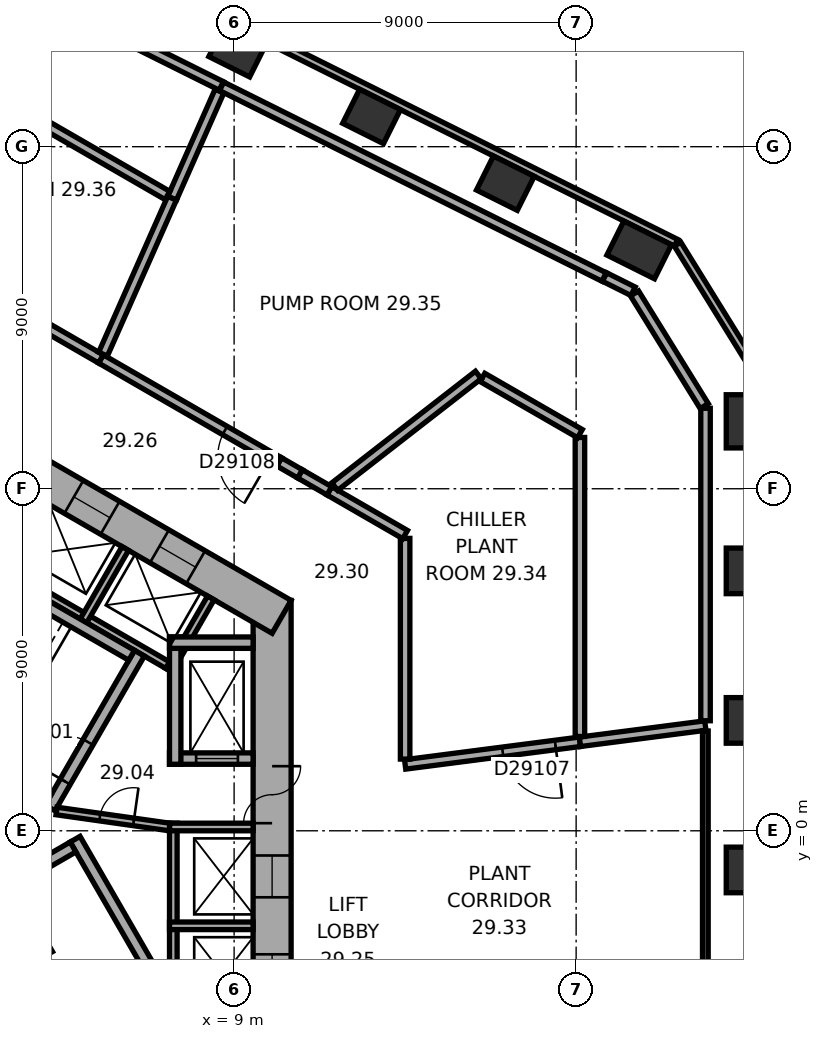
"""IFC4 building model, lengths in metres.
Left out: names, types, materials, properties, quantities, classifications, styles, units other than length and angle.
Written with IfcOpenShell. Run it as: python <this file> out.ifc"""

import sys

from ifc_helpers import new_model, si_unit, direction, frame, frame_2d, origin, origin_2d, place, context, subcontext, project, spatial, rectangle, extrude, element, fill, save


model = new_model("IFC4")
c1 = context("Model", 3, precision=1e-05, world=origin(), true_north=direction((0.0, 1.0)))
c2 = subcontext(c1, "Body", "Model", "MODEL_VIEW")
j1 = project(units=[si_unit("LENGTHUNIT", "METRE"), si_unit("PLANEANGLEUNIT", "RADIAN")], contexts=[c1])
p1 = place(None, origin())
s1 = spatial("IfcSite", under=j1, at=p1, CompositionType="ELEMENT")
p2 = place(p1, origin())
s2 = spatial("IfcBuilding", under=s1, at=p2, CompositionType="ELEMENT")
p3 = place(p2, frame((0.0, 0.0, 119.9)))
s3 = spatial("IfcBuildingStorey", under=s2, at=p3, CompositionType="ELEMENT", Elevation=119.9)
for number, where, z_axis, x_axis in (
    (1, (22.45, -1.03, 0.0), (0.0, 0.0, 1.0), (0.0, 1.0, 0.0)),
    (2, (22.45, 2.905, 0.0), (0.0, 0.0, 1.0), (0.0, 1.0, 0.0)),
    (3, (22.45, 6.839, 0.0), (0.0, 0.0, 1.0), (0.0, 1.0, 0.0)),
):
    element("IfcColumn", number, at=place(p3, frame(where, z_axis=z_axis, x_axis=x_axis)), inside=s3, PredefinedType="COLUMN", context=c2, shape_type="SweptSolid", body=[
        extrude(rectangle(XDim=1.2, YDim=1.0, at=origin_2d()), origin(), (0.0, 0.0, 1.0), 4.5),
    ])
for number, where, z_axis, x_axis in (
    (4, (22.45, 10.774, 0.0), (0.0, 0.0, 1.0), (0.0, 1.0, 0.0)),
    (5, (19.659, 15.284, 0.0), (0.0, 0.0, 1.0), (-0.895, 0.446, 0.0)),
):
    element("IfcColumn", number, at=place(p3, frame(where, z_axis=z_axis, x_axis=x_axis)), inside=s3, PredefinedType="COLUMN", context=c2, shape_type="SweptSolid", body=[
        extrude(rectangle(XDim=1.4, YDim=1.0, at=origin_2d()), origin(), (0.0, 0.0, 1.0), 4.5),
    ])
for number, where, z_axis, x_axis in (
    (6, (16.138, 17.04, 0.0), (0.0, 0.0, 1.0), (-0.895, 0.446, 0.0)),
    (7, (12.616, 18.795, 0.0), (0.0, 0.0, 1.0), (-0.895, 0.446, 0.0)),
    (8, (9.095, 20.551, 0.0), (0.0, 0.0, 1.0), (-0.895, 0.446, 0.0)),
):
    element("IfcColumn", number, at=place(p3, frame(where, z_axis=z_axis, x_axis=x_axis)), inside=s3, PredefinedType="COLUMN", context=c2, shape_type="SweptSolid", body=[
        extrude(rectangle(XDim=1.2, YDim=1.0, at=origin_2d()), origin(), (0.0, 0.0, 1.0), 4.5),
    ])
p4 = place(p3, frame((10.0, -6.062, 0.0), z_axis=(0.0, 0.0, 1.0), x_axis=(0.0, 1.0, 0.0)))
e9 = element("IfcWall", 9, at=p4, inside=s3, PredefinedType="SHEAR", context=c2, shape_type="SweptSolid", body=[
    extrude(rectangle(XDim=12.125, YDim=1.0, at=frame_2d((6.062, 0.0))), origin(), (0.0, 0.0, 1.0), 4.5),
])
p5 = place(p4, frame((6.262, 0.0, 0.0)))
e10 = element("IfcOpeningElement", 10, at=p5, cuts=e9, PredefinedType="OPENING", context=c2, shape_type="SweptSolid", body=[
    extrude(rectangle(XDim=1.5, YDim=2.1, at=frame_2d((0.75, 1.05))), frame((0.0, 0.51, 0.0), z_axis=(0.0, -1.0, 0.0), x_axis=(1.0, 0.0, 0.0)), (0.0, 0.0, 1.0), 1.02),
])
p6 = place(p4, frame((1.712, 0.0, 0.0)))
e11 = element("IfcOpeningElement", 11, at=p6, cuts=e9, PredefinedType="OPENING", context=c2, shape_type="SweptSolid", body=[
    extrude(rectangle(XDim=1.1, YDim=2.1, at=frame_2d((0.55, 1.05))), frame((0.0, 0.51, 0.0), z_axis=(0.0, -1.0, 0.0), x_axis=(1.0, 0.0, 0.0)), (0.0, 0.0, 1.0), 1.02),
])
p7 = place(p4, frame((4.312, 0.0, 0.0)))
e12 = element("IfcOpeningElement", 12, at=p7, cuts=e9, PredefinedType="OPENING", context=c2, shape_type="SweptSolid", body=[
    extrude(rectangle(XDim=1.1, YDim=2.1, at=frame_2d((0.55, 1.05))), frame((0.0, 0.51, 0.0), z_axis=(0.0, -1.0, 0.0), x_axis=(1.0, 0.0, 0.0)), (0.0, 0.0, 1.0), 1.02),
])
p8 = place(p3, frame((10.25, 5.629, 0.0), z_axis=(0.0, 0.0, 1.0), x_axis=(-0.866022616891, 0.50000482701, 0.0)))
e13 = element("IfcWall", 13, at=p8, inside=s3, PredefinedType="SHEAR", context=c2, shape_type="SweptSolid", body=[
    extrude(rectangle(XDim=12.125, YDim=1.0, at=frame_2d((6.062, 0.0))), origin(), (0.0, 0.0, 1.0), 4.5),
])
p9 = place(p8, frame((2.612, 0.0, 0.0)))
e14 = element("IfcOpeningElement", 14, at=p9, cuts=e13, PredefinedType="OPENING", context=c2, shape_type="SweptSolid", body=[
    extrude(rectangle(XDim=1.1, YDim=2.1, at=frame_2d((0.55, 1.05))), frame((0.0, 0.51, 0.0), z_axis=(0.0, -1.0, 0.0), x_axis=(1.0, 0.0, 0.0)), (0.0, 0.0, 1.0), 1.02),
])
p10 = place(p8, frame((5.212, 0.0, 0.0)))
e15 = element("IfcOpeningElement", 15, at=p10, cuts=e13, PredefinedType="OPENING", context=c2, shape_type="SweptSolid", body=[
    extrude(rectangle(XDim=1.1, YDim=2.1, at=frame_2d((0.55, 1.05))), frame((0.0, 0.51, 0.0), z_axis=(0.0, -1.0, 0.0), x_axis=(1.0, 0.0, 0.0)), (0.0, 0.0, 1.0), 1.02),
])
p11 = place(p8, frame((7.812, 0.0, 0.0)))
e16 = element("IfcOpeningElement", 16, at=p11, cuts=e13, PredefinedType="OPENING", context=c2, shape_type="SweptSolid", body=[
    extrude(rectangle(XDim=1.1, YDim=2.1, at=frame_2d((0.55, 1.05))), frame((0.0, 0.51, 0.0), z_axis=(0.0, -1.0, 0.0), x_axis=(1.0, 0.0, 0.0)), (0.0, 0.0, 1.0), 1.02),
])
p12 = place(p3, frame((23.035, 11.612, 0.0), z_axis=(0.0, 0.0, 1.0), x_axis=(-0.526160091227, 0.850385535155, 0.0)))
e17 = element("IfcWall", 17, at=p12, inside=s3, PredefinedType="STANDARD", context=c2, shape_type="SweptSolid", body=[
    extrude(rectangle(XDim=4.494, YDim=0.2, at=frame_2d((2.247, 0.0))), origin(), (0.0, 0.0, 1.0), 4.5),
])
p13 = place(p3, frame((20.63, 15.47, 0.0), z_axis=(0.0, 0.0, 1.0), x_axis=(-0.894934518609, 0.446197498203, 0.0)))
e18 = element("IfcWall", 18, at=p13, inside=s3, PredefinedType="STANDARD", context=c2, shape_type="SweptSolid", body=[
    extrude(rectangle(XDim=21.246, YDim=0.2, at=frame_2d((10.623, 0.0))), origin(), (0.0, 0.0, 1.0), 4.5),
])
p14 = place(p3, frame((7.4, -5.2, 0.0), z_axis=(0.0, 0.0, 1.0), x_axis=(0.0, 1.0, 0.0)))
e19 = element("IfcWall", 19, at=p14, inside=s3, PredefinedType="PARTITIONING", context=c2, shape_type="SweptSolid", body=[
    extrude(rectangle(XDim=5.4, YDim=0.2, at=frame_2d((2.7, 0.0))), origin(), (0.0, 0.0, 1.0), 4.22),
])
for number, where, z_axis, x_axis in (
    (20, (7.3, -2.5, 0.0), (0.0, 0.0, 1.0), (1.0, 0.0, 0.0)),
    (21, (7.3, 0.1, 0.0), (0.0, 0.0, 1.0), (1.0, 0.0, 0.0)),
):
    element("IfcWall", number, at=place(p3, frame(where, z_axis=z_axis, x_axis=x_axis)), inside=s3, PredefinedType="PARTITIONING", context=c2, shape_type="SweptSolid", body=[
        extrude(rectangle(XDim=2.2, YDim=0.2, at=frame_2d((1.1, 0.0))), origin(), (0.0, 0.0, 1.0), 4.22),
    ])
p15 = place(p3, frame((7.424, 4.259, 0.0), z_axis=(0.0, 0.0, 1.0), x_axis=(-0.866026010844, 0.49999894854, 0.0)))
e22 = element("IfcWall", 22, at=p15, inside=s3, PredefinedType="PARTITIONING", context=c2, shape_type="SweptSolid", body=[
    extrude(rectangle(XDim=8.0, YDim=0.2, at=frame_2d((4.0, 0.0))), origin(), (0.0, 0.0, 1.0), 4.22),
])
for number, where, z_axis, x_axis in (
    (23, (7.287, 4.222, 0.0), (0.0, 0.0, 1.0), (0.5, 0.866, 0.0)),
    (24, (5.036, 5.522, 0.0), (0.0, 0.0, 1.0), (0.5, 0.866, 0.0)),
):
    element("IfcWall", number, at=place(p3, frame(where, z_axis=z_axis, x_axis=x_axis)), inside=s3, PredefinedType="PARTITIONING", context=c2, shape_type="SweptSolid", body=[
        extrude(rectangle(XDim=2.2, YDim=0.2, at=frame_2d((1.1, 0.0))), origin(), (0.0, 0.0, 1.0), 4.22),
    ])
p16 = place(p3, frame((4.158, 0.602, 0.0), z_axis=(0.0, 0.0, 1.0), x_axis=(0.499977259774, 0.866038532462, 0.0)))
e25 = element("IfcWall", 25, at=p16, inside=s3, PredefinedType="SHEAR", context=c2, shape_type="SweptSolid", body=[
    extrude(rectangle(XDim=4.7, YDim=0.3, at=frame_2d((2.35, 0.0))), origin(), (0.0, 0.0, 1.0), 4.22),
])
p17 = place(p16, frame((0.8, 0.0, 0.0)))
e26 = element("IfcOpeningElement", 26, at=p17, cuts=e25, PredefinedType="OPENING", context=c2, shape_type="SweptSolid", body=[
    extrude(rectangle(XDim=1.2, YDim=2.1, at=frame_2d((0.6, 1.05))), frame((0.0, 0.16, 0.0), z_axis=(0.0, -1.0, 0.0), x_axis=(1.0, 0.0, 0.0)), (0.0, 0.0, 1.0), 0.32),
])
p18 = place(p3, frame((6.303, 4.617, 0.0), z_axis=(0.0, 0.0, 1.0), x_axis=(-0.866027801685, 0.499995846692, 0.0)))
e27 = element("IfcWall", 27, at=p18, inside=s3, PredefinedType="SHEAR", context=c2, shape_type="SweptSolid", body=[
    extrude(rectangle(XDim=7.06, YDim=0.3, at=frame_2d((3.53, 0.0))), origin(), (0.0, 0.0, 1.0), 4.22),
])
p19 = place(p3, frame((4.816, -0.222, 0.0), z_axis=(0.0, 0.0, 1.0), x_axis=(0.499977259774, -0.866038532462, 0.0)))
e28 = element("IfcWall", 28, at=p19, inside=s3, PredefinedType="SHEAR", context=c2, shape_type="SweptSolid", body=[
    extrude(rectangle(XDim=4.7, YDim=0.3, at=frame_2d((2.35, 0.0))), origin(), (0.0, 0.0, 1.0), 4.22),
])
p20 = place(p3, frame((-1.353, -3.957, 0.0), z_axis=(0.0, 0.0, 1.0), x_axis=(0.866027801685, 0.499995846692, 0.0)))
e29 = element("IfcWall", 29, at=p20, inside=s3, PredefinedType="SHEAR", context=c2, shape_type="SweptSolid", body=[
    extrude(rectangle(XDim=7.06, YDim=0.3, at=frame_2d((3.53, 0.0))), origin(), (0.0, 0.0, 1.0), 4.22),
])
p21 = place(p3, frame((7.3, 1.9, 0.0), z_axis=(0.0, 0.0, 1.0), x_axis=(1.0, 0.0, 0.0)))
e30 = element("IfcWall", 30, at=p21, inside=s3, PredefinedType="SHEAR", context=c2, shape_type="SweptSolid", body=[
    extrude(rectangle(XDim=2.2, YDim=0.3, at=frame_2d((1.1, 0.0))), origin(), (0.0, 0.0, 1.0), 4.22),
])
p22 = place(p21, frame((0.7, 0.0, 0.0)))
e31 = element("IfcOpeningElement", 31, at=p22, cuts=e30, PredefinedType="OPENING", context=c2, shape_type="SweptSolid", body=[
    extrude(rectangle(XDim=1.1, YDim=2.1, at=frame_2d((0.55, 1.05))), frame((0.0, 0.16, 0.0), z_axis=(0.0, -1.0, 0.0), x_axis=(1.0, 0.0, 0.0)), (0.0, 0.0, 1.0), 0.32),
])
p23 = place(p3, frame((7.45, 1.75, 0.0), z_axis=(0.0, 0.0, 1.0), x_axis=(0.0, 1.0, 0.0)))
e32 = element("IfcWall", 32, at=p23, inside=s3, PredefinedType="SHEAR", context=c2, shape_type="SweptSolid", body=[
    extrude(rectangle(XDim=3.35, YDim=0.3, at=frame_2d((1.675, 0.0))), origin(), (0.0, 0.0, 1.0), 4.22),
])
p24 = place(p3, frame((7.3, 4.95, 0.0), z_axis=(0.0, 0.0, 1.0), x_axis=(1.0, 0.0, 0.0)))
e33 = element("IfcWall", 33, at=p24, inside=s3, PredefinedType="SHEAR", context=c2, shape_type="SweptSolid", body=[
    extrude(rectangle(XDim=2.2, YDim=0.3, at=frame_2d((1.1, 0.0))), origin(), (0.0, 0.0, 1.0), 4.22),
])
p25 = place(p3, frame((4.327, 0.521, 0.0), z_axis=(0.0, 0.0, 1.0), x_axis=(0.990124376366, -0.14019172346, 0.0)))
e34 = element("IfcWall", 34, at=p25, inside=s3, PredefinedType="PARTITIONING", context=c2, shape_type="SweptSolid", body=[
    extrude(rectangle(XDim=3.002, YDim=0.2, at=frame_2d((1.501, 0.0))), origin(), (0.0, 0.0, 1.0), 4.22),
])
p26 = place(p25, frame((1.15, 0.0, 0.0)))
e35 = element("IfcOpeningElement", 35, at=p26, cuts=e34, PredefinedType="OPENING", context=c2, shape_type="SweptSolid", body=[
    extrude(rectangle(XDim=0.9, YDim=2.1, at=frame_2d((0.45, 1.05))), frame((0.0, 0.11, 0.0), z_axis=(0.0, -1.0, 0.0), x_axis=(1.0, 0.0, 0.0)), (0.0, 0.0, 1.0), 0.22),
])
p27 = place(p3, frame((18.1, 2.342, 0.0), z_axis=(0.0, 0.0, 1.0), x_axis=(-0.991739248087, -0.128270276382, 0.0)))
e36 = element("IfcWall", 36, at=p27, inside=s3, PredefinedType="SOLIDWALL", context=c2, shape_type="SweptSolid", body=[
    extrude(rectangle(XDim=4.638, YDim=0.25, at=frame_2d((2.319, 0.0))), origin(), (0.0, 0.0, 1.0), 3.2),
])
p28 = place(p27, frame((0.65, 0.0, 0.0)))
e37 = element("IfcOpeningElement", 37, at=p28, cuts=e36, PredefinedType="OPENING", context=c2, shape_type="SweptSolid", body=[
    extrude(rectangle(XDim=1.4, YDim=2.1, at=frame_2d((0.7, 1.05))), frame((0.0, 0.135, 0.0), z_axis=(0.0, -1.0, 0.0), x_axis=(1.0, 0.0, 0.0)), (0.0, 0.0, 1.0), 0.27),
])
p29 = place(p3, frame((18.1, 2.342, 0.0), z_axis=(0.0, 0.0, 1.0), x_axis=(0.99173002922, 0.128341533193, 0.0)))
e38 = element("IfcWall", 38, at=p29, inside=s3, PredefinedType="SOLIDWALL", context=c2, shape_type="SweptSolid", body=[
    extrude(rectangle(XDim=3.327, YDim=0.25, at=frame_2d((1.664, 0.0))), origin(), (0.0, 0.0, 1.0), 3.2),
])
p30 = place(p3, frame((21.4, 2.626, 0.0), z_axis=(0.0, 0.0, 1.0), x_axis=(0.0, -1.0, 0.0)))
e39 = element("IfcWall", 39, at=p30, inside=s3, PredefinedType="PARTITIONING", context=c2, shape_type="SweptSolid", body=[
    extrude(rectangle(XDim=11.109, YDim=0.15, at=frame_2d((5.554, 0.0))), origin(), (0.0, 0.0, 1.0), 3.72),
])
p31 = place(p3, frame((13.5, 7.694, 0.0), z_axis=(0.0, 0.0, 1.0), x_axis=(0.0, -1.0, 0.0)))
e40 = element("IfcWall", 40, at=p31, inside=s3, PredefinedType="SOLIDWALL", context=c2, shape_type="SweptSolid", body=[
    extrude(rectangle(XDim=5.808, YDim=0.25, at=frame_2d((2.904, 0.0))), origin(), (0.0, 0.0, 1.0), 4.22),
])
p32 = place(p3, frame((13.5, 7.794, 0.0), z_axis=(0.0, 0.0, 1.0), x_axis=(-0.86594365243, 0.500141570774, 0.0)))
e41 = element("IfcWall", 41, at=p32, inside=s3, PredefinedType="SOLIDWALL", context=c2, shape_type="SweptSolid", body=[
    extrude(rectangle(XDim=2.302, YDim=0.25, at=frame_2d((1.151, 0.0))), origin(), (0.0, 0.0, 1.0), 4.22),
])
p33 = place(p3, frame((10.733, 9.392, 0.0), z_axis=(0.0, 0.0, 1.0), x_axis=(0.86606255962, -0.499935638681, 0.0)))
e42 = element("IfcWall", 42, at=p33, inside=s3, PredefinedType="SOLIDWALL", context=c2, shape_type="SweptSolid", body=[
    extrude(rectangle(XDim=0.892, YDim=0.25, at=frame_2d((0.446, 0.0))), origin(), (0.0, 0.0, 1.0), 4.22),
])
p34 = place(p3, frame((10.186, 9.708, 0.0), z_axis=(0.0, 0.0, 1.0), x_axis=(0.866024844342, -0.500000968981, 0.0)))
e43 = element("IfcWall", 43, at=p34, inside=s3, PredefinedType="SOLIDWALL", context=c2, shape_type="SweptSolid", body=[
    extrude(rectangle(XDim=0.632, YDim=0.25, at=frame_2d((0.316, 0.0))), origin(), (0.0, 0.0, 1.0), 4.22),
])
p35 = place(p3, frame((10.186, 9.708, 0.0), z_axis=(0.0, 0.0, 1.0), x_axis=(-0.866018196172, 0.500012483742, 0.0)))
e44 = element("IfcWall", 44, at=p35, inside=s3, PredefinedType="SOLIDWALL", context=c2, shape_type="SweptSolid", body=[
    extrude(rectangle(XDim=5.416, YDim=0.25, at=frame_2d((2.708, 0.0))), origin(), (0.0, 0.0, 1.0), 4.22),
])
p36 = place(p35, frame((0.25, 0.0, 0.0)))
e45 = element("IfcOpeningElement", 45, at=p36, cuts=e44, PredefinedType="OPENING", context=c2, shape_type="SweptSolid", body=[
    extrude(rectangle(XDim=1.4, YDim=2.1, at=frame_2d((0.7, 1.05))), frame((0.0, 0.135, 0.0), z_axis=(0.0, -1.0, 0.0), x_axis=(1.0, 0.0, 0.0)), (0.0, 0.0, 1.0), 0.27),
])
p37 = place(p3, frame((18.1, 10.35, 0.0), z_axis=(0.0, 0.0, 1.0), x_axis=(0.0, -1.0, 0.0)))
e46 = element("IfcWall", 46, at=p37, inside=s3, PredefinedType="SOLIDWALL", context=c2, shape_type="SweptSolid", body=[
    extrude(rectangle(XDim=7.868, YDim=0.25, at=frame_2d((3.934, 0.0))), origin(), (0.0, 0.0, 1.0), 4.22),
])
p38 = place(p3, frame((21.405, 11.117, 0.0), z_axis=(0.0, 0.0, 1.0), x_axis=(0.0, -1.0, 0.0)))
e47 = element("IfcWall", 47, at=p38, inside=s3, PredefinedType="SOLIDWALL", context=c2, shape_type="SweptSolid", body=[
    extrude(rectangle(XDim=8.222, YDim=0.25, at=frame_2d((4.111, 0.0))), origin(), (0.0, 0.0, 1.0), 3.72),
])
p39 = place(p3, frame((15.534, 11.929, 0.0), z_axis=(0.0, 0.0, 1.0), x_axis=(0.866359837259, -0.499420296328, 0.0)))
e48 = element("IfcWall", 48, at=p39, inside=s3, PredefinedType="SOLIDWALL", context=c2, shape_type="SweptSolid", body=[
    extrude(rectangle(XDim=2.961, YDim=0.25, at=frame_2d((1.481, 0.0))), origin(), (0.0, 0.0, 1.0), 4.22),
])
p40 = place(p3, frame((15.427, 11.993, 0.0), z_axis=(0.0, 0.0, 1.0), x_axis=(-0.789492280001, -0.613760490597, 0.0)))
e49 = element("IfcWall", 49, at=p40, inside=s3, PredefinedType="SOLIDWALL", context=c2, shape_type="SweptSolid", body=[
    extrude(rectangle(XDim=4.786, YDim=0.25, at=frame_2d((2.393, 0.0))), origin(), (0.0, 0.0, 1.0), 3.2),
])
p41 = place(p3, frame((5.495, 12.416, 0.0), z_axis=(0.0, 0.0, 1.0), x_axis=(-0.866043744811, 0.499968231064, 0.0)))
e50 = element("IfcWall", 50, at=p41, inside=s3, PredefinedType="SOLIDWALL", context=c2, shape_type="SweptSolid", body=[
    extrude(rectangle(XDim=2.551, YDim=0.25, at=frame_2d((1.275, 0.0))), origin(), (0.0, 0.0, 1.0), 4.22),
])
p42 = place(p3, frame((19.537, 14.139, 0.0), z_axis=(0.0, 0.0, 1.0), x_axis=(0.52617859546, -0.850374085729, 0.0)))
e51 = element("IfcWall", 51, at=p42, inside=s3, PredefinedType="SOLIDWALL", context=c2, shape_type="SweptSolid", body=[
    extrude(rectangle(XDim=3.486, YDim=0.25, at=frame_2d((1.743, 0.0))), origin(), (0.0, 0.0, 1.0), 4.22),
])
p43 = place(p3, frame((18.748, 14.571, 0.0), z_axis=(0.0, 0.0, 1.0), x_axis=(0.894659751278, -0.446748172289, 0.0)))
e52 = element("IfcWall", 52, at=p43, inside=s3, PredefinedType="SOLIDWALL", context=c2, shape_type="SweptSolid", body=[
    extrude(rectangle(XDim=0.839, YDim=0.25, at=frame_2d((0.42, 0.0))), origin(), (0.0, 0.0, 1.0), 4.22),
])
p44 = place(p3, frame((7.367, 16.646, 0.0), z_axis=(0.0, 0.0, 1.0), x_axis=(-0.404689706038, -0.914454067642, 0.0)))
e53 = element("IfcWall", 53, at=p44, inside=s3, PredefinedType="SOLIDWALL", context=c2, shape_type="SweptSolid", body=[
    extrude(rectangle(XDim=4.489, YDim=0.25, at=frame_2d((2.245, 0.0))), origin(), (0.0, 0.0, 1.0), 3.2),
])
p45 = place(p3, frame((7.37, 16.648, 0.0), z_axis=(0.0, 0.0, 1.0), x_axis=(0.404230252102, 0.914657260008, 0.0)))
e54 = element("IfcWall", 54, at=p45, inside=s3, PredefinedType="SOLIDWALL", context=c2, shape_type="SweptSolid", body=[
    extrude(rectangle(XDim=3.076, YDim=0.25, at=frame_2d((1.538, 0.0))), origin(), (0.0, 0.0, 1.0), 3.2),
])
p46 = place(p3, frame((8.671, 19.589, 0.0), z_axis=(0.0, 0.0, 1.0), x_axis=(0.894943312415, -0.446179860106, 0.0)))
e55 = element("IfcWall", 55, at=p46, inside=s3, PredefinedType="SOLIDWALL", context=c2, shape_type="SweptSolid", body=[
    extrude(rectangle(XDim=11.245, YDim=0.25, at=frame_2d((5.623, 0.0))), origin(), (0.0, 0.0, 1.0), 3.72),
])
p47 = place(p3, frame((0.087, 20.85, 0.0), z_axis=(0.0, 0.0, 1.0), x_axis=(0.86602280332, -0.500004504109, 0.0)))
e56 = element("IfcWall", 56, at=p47, inside=s3, PredefinedType="SOLIDWALL", context=c2, shape_type="SweptSolid", body=[
    extrude(rectangle(XDim=8.267, YDim=0.25, at=frame_2d((4.134, 0.0))), origin(), (0.0, 0.0, 1.0), 4.22),
])
p48 = place(p3, frame((1.233, 23.303, 0.0), z_axis=(0.0, 0.0, 1.0), x_axis=(0.894944104828, -0.446178270688, 0.0)))
e57 = element("IfcWall", 57, at=p48, inside=s3, PredefinedType="SOLIDWALL", context=c2, shape_type="SweptSolid", body=[
    extrude(rectangle(XDim=8.303, YDim=0.25, at=frame_2d((4.151, 0.0))), origin(), (0.0, 0.0, 1.0), 3.72),
])
p49 = place(p5, origin())
e58 = element("IfcDoor", 58, at=p49, inside=s3, OperationType="DOUBLE_DOOR_SINGLE_SWING", PredefinedType="DOOR", context=c2, shape_type="SweptSolid", body=[
    extrude(rectangle(XDim=1.5, YDim=2.1, at=frame_2d((0.75, 1.05))), frame((0.0, 0.025, 0.0), z_axis=(0.0, -1.0, 0.0), x_axis=(1.0, 0.0, 0.0)), (0.0, 0.0, 1.0), 0.05),
])
fill(e10, e58)
p50 = place(p17, origin())
e59 = element("IfcDoor", 59, at=p50, inside=s3, OperationType="SINGLE_SWING_RIGHT", PredefinedType="DOOR", context=c2, shape_type="SweptSolid", body=[
    extrude(rectangle(XDim=1.2, YDim=2.1, at=frame_2d((0.6, 1.05))), frame((0.0, 0.025, 0.0), z_axis=(0.0, -1.0, 0.0), x_axis=(1.0, 0.0, 0.0)), (0.0, 0.0, 1.0), 0.05),
])
fill(e26, e59)
p51 = place(p26, origin())
e60 = element("IfcDoor", 60, at=p51, inside=s3, OperationType="SINGLE_SWING_LEFT", PredefinedType="DOOR", context=c2, shape_type="SweptSolid", body=[
    extrude(rectangle(XDim=0.9, YDim=2.1, at=frame_2d((0.45, 1.05))), frame((0.0, 0.025, 0.0), z_axis=(0.0, -1.0, 0.0), x_axis=(1.0, 0.0, 0.0)), (0.0, 0.0, 1.0), 0.05),
])
fill(e35, e60)
p52 = place(p22, origin())
e61 = element("IfcDoor", 61, at=p52, inside=s3, OperationType="DOUBLE_DOOR_SLIDING", PredefinedType="DOOR", context=c2, shape_type="SweptSolid", body=[
    extrude(rectangle(XDim=1.1, YDim=2.1, at=frame_2d((0.55, 1.05))), frame((0.0, 0.025, 0.0), z_axis=(0.0, -1.0, 0.0), x_axis=(1.0, 0.0, 0.0)), (0.0, 0.0, 1.0), 0.05),
])
fill(e31, e61)
p53 = place(p6, origin())
e62 = element("IfcDoor", 62, at=p53, inside=s3, OperationType="DOUBLE_DOOR_SLIDING", PredefinedType="DOOR", context=c2, shape_type="SweptSolid", body=[
    extrude(rectangle(XDim=1.1, YDim=2.1, at=frame_2d((0.55, 1.05))), frame((0.0, 0.025, 0.0), z_axis=(0.0, -1.0, 0.0), x_axis=(1.0, 0.0, 0.0)), (0.0, 0.0, 1.0), 0.05),
])
fill(e11, e62)
p54 = place(p7, origin())
e63 = element("IfcDoor", 63, at=p54, inside=s3, OperationType="DOUBLE_DOOR_SLIDING", PredefinedType="DOOR", context=c2, shape_type="SweptSolid", body=[
    extrude(rectangle(XDim=1.1, YDim=2.1, at=frame_2d((0.55, 1.05))), frame((0.0, 0.025, 0.0), z_axis=(0.0, -1.0, 0.0), x_axis=(1.0, 0.0, 0.0)), (0.0, 0.0, 1.0), 0.05),
])
fill(e12, e63)
p55 = place(p9, origin())
e64 = element("IfcDoor", 64, at=p55, inside=s3, OperationType="DOUBLE_DOOR_SLIDING", PredefinedType="DOOR", context=c2, shape_type="SweptSolid", body=[
    extrude(rectangle(XDim=1.1, YDim=2.1, at=frame_2d((0.55, 1.05))), frame((0.0, 0.025, 0.0), z_axis=(0.0, -1.0, 0.0), x_axis=(1.0, 0.0, 0.0)), (0.0, 0.0, 1.0), 0.05),
])
fill(e14, e64)
p56 = place(p10, origin())
e65 = element("IfcDoor", 65, at=p56, inside=s3, OperationType="DOUBLE_DOOR_SLIDING", PredefinedType="DOOR", context=c2, shape_type="SweptSolid", body=[
    extrude(rectangle(XDim=1.1, YDim=2.1, at=frame_2d((0.55, 1.05))), frame((0.0, 0.025, 0.0), z_axis=(0.0, -1.0, 0.0), x_axis=(1.0, 0.0, 0.0)), (0.0, 0.0, 1.0), 0.05),
])
fill(e15, e65)
p57 = place(p28, origin())
e66 = element("IfcDoor", 66, at=p57, inside=s3, OperationType="SINGLE_SWING_LEFT", PredefinedType="DOOR", context=c2, shape_type="SweptSolid", body=[
    extrude(rectangle(XDim=1.4, YDim=2.1, at=frame_2d((0.7, 1.05))), frame((0.0, 0.025, 0.0), z_axis=(0.0, -1.0, 0.0), x_axis=(1.0, 0.0, 0.0)), (0.0, 0.0, 1.0), 0.05),
])
fill(e37, e66)
p58 = place(p36, origin())
e67 = element("IfcDoor", 67, at=p58, inside=s3, OperationType="SINGLE_SWING_LEFT", PredefinedType="DOOR", context=c2, shape_type="SweptSolid", body=[
    extrude(rectangle(XDim=1.4, YDim=2.1, at=frame_2d((0.7, 1.05))), frame((0.0, 0.025, 0.0), z_axis=(0.0, -1.0, 0.0), x_axis=(1.0, 0.0, 0.0)), (0.0, 0.0, 1.0), 0.05),
])
fill(e45, e67)
save(model, sys.argv[1])
